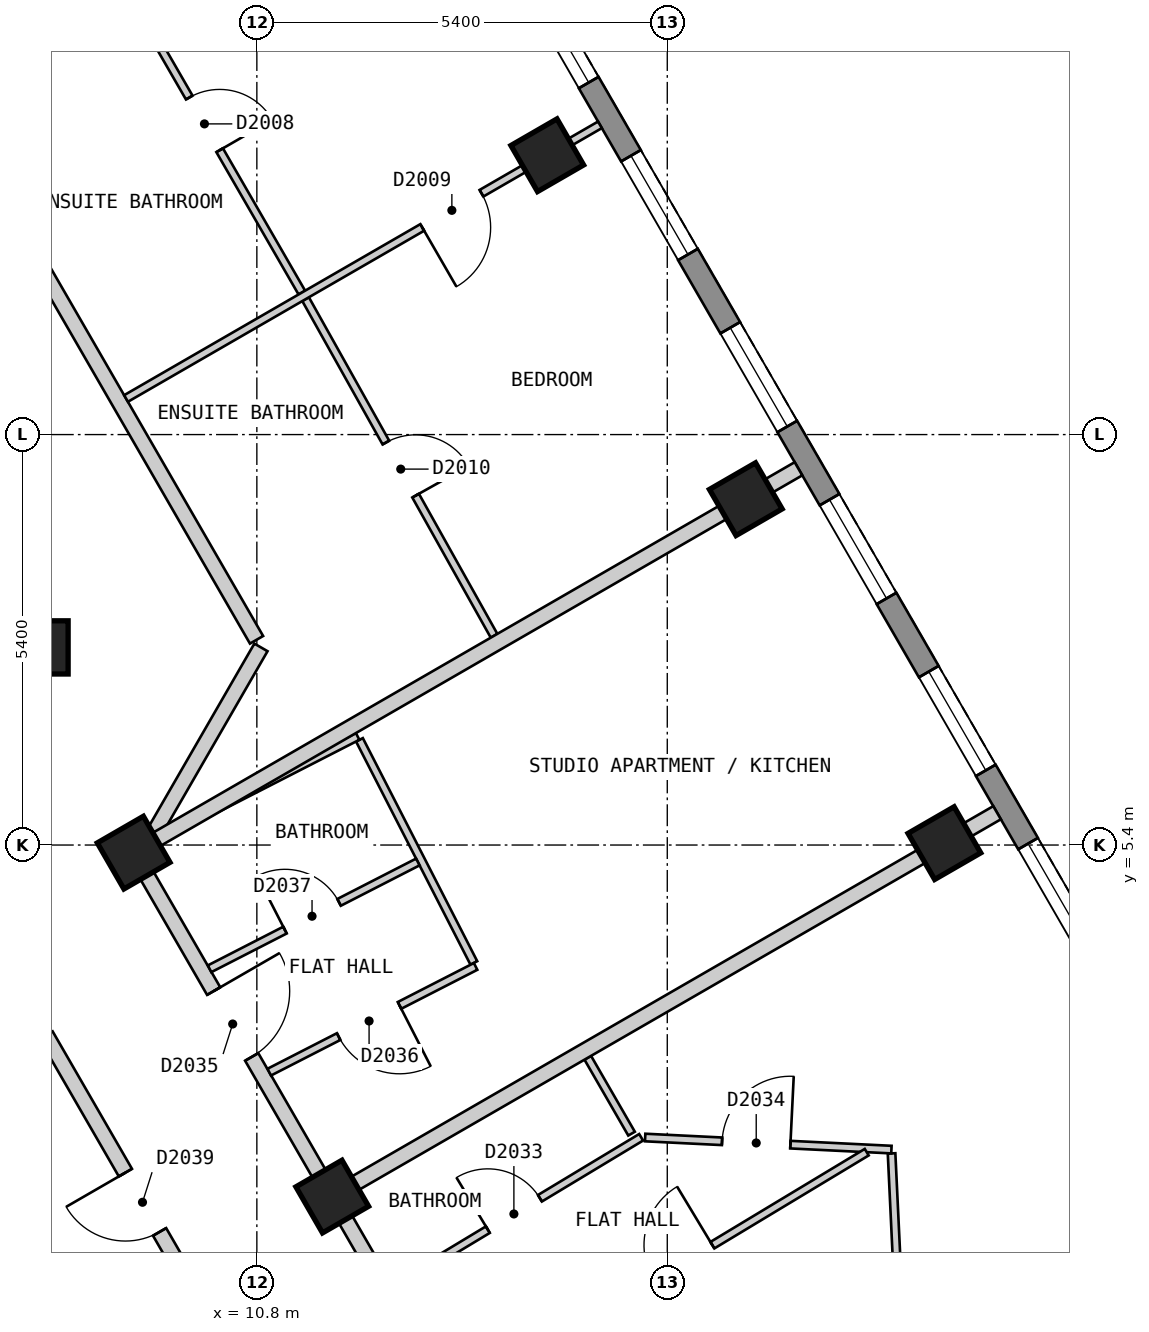
"""IFC4 building model, lengths in metres.
Left out: names, types, materials, properties, quantities, classifications, styles, units other than length and angle.
Written with IfcOpenShell. Run it as: python <this file> out.ifc"""

import sys

from ifc_helpers import new_model, si_unit, direction, frame, frame_2d, origin, origin_2d, place, context, subcontext, project, spatial, polyline, rectangle, outline, extrude, element, fill, save


model = new_model("IFC4")
c1 = context("Model", 3, precision=1e-05, world=origin(), true_north=direction((0.0, 1.0)))
c2 = subcontext(c1, "Body", "Model", "MODEL_VIEW")
j1 = project(units=[si_unit("LENGTHUNIT", "METRE"), si_unit("PLANEANGLEUNIT", "RADIAN")], contexts=[c1])
p1 = place(None, origin())
s1 = spatial("IfcSite", under=j1, at=p1, CompositionType="ELEMENT")
p2 = place(p1, origin())
s2 = spatial("IfcBuilding", under=s1, at=p2, CompositionType="ELEMENT")
p3 = place(p2, frame((0.0, 0.0, 238.8)))
s3 = spatial("IfcBuildingStorey", under=s2, at=p3, CompositionType="ELEMENT", Elevation=238.8)
for number, where, z_axis, x_axis in (
    (1, (19.846, 5.425, 0.0), (0.0, 0.0, 1.0), (-0.5, 0.866, 0.0)),
    (2, (17.233, 9.95, 0.0), (0.0, 0.0, 1.0), (-0.5, 0.866, 0.0)),
    (3, (14.621, 14.475, 0.0), (0.0, 0.0, 1.0), (-0.5, 0.866, 0.0)),
    (4, (11.792, 0.775, 0.0), (0.0, 0.0, 1.0), (-0.5, 0.866, 0.0)),
    (5, (9.179, 5.3, 0.0), (0.0, 0.0, 1.0), (-0.5, 0.866, 0.0)),
    (6, (7.967, 8.0, 0.0), (0.0, 0.0, 1.0), (1.0, 0.0, 0.0)),
):
    element("IfcColumn", number, at=place(p3, frame(where, z_axis=z_axis, x_axis=x_axis)), inside=s3, PredefinedType="COLUMN", context=c2, shape_type="SweptSolid", body=[
        extrude(rectangle(XDim=0.7, YDim=0.7, at=origin_2d()), origin(), (0.0, 0.0, 1.0), 3.0),
    ])
p4 = place(p3, frame((23.599, 0.825, 0.0), z_axis=(0.0, 0.0, 1.0), x_axis=(-0.500003656944, 0.866023292436, 0.0)))
e7 = element("IfcWall", 7, at=p4, inside=s3, PredefinedType="SOLIDWALL", context=c2, shape_type="SweptSolid", body=[
    extrude(outline(polyline([(0.0, -0.15), (22.17, -0.15), (22.09, 0.15), (0.08, 0.15), (0.0, -0.15)])), origin(), (0.0, 0.0, 1.0), 2.7),
])
p5 = place(p4, frame((1.191, 0.0, 0.15)))
e8 = element("IfcOpeningElement", 8, at=p5, cuts=e7, PredefinedType="OPENING", context=c2, shape_type="SweptSolid", body=[
    extrude(rectangle(XDim=1.5, YDim=2.1, at=frame_2d((0.75, 1.05))), frame((0.0, 0.16, 0.0), z_axis=(0.0, -1.0, 0.0), x_axis=(1.0, 0.0, 0.0)), (0.0, 0.0, 1.0), 0.32),
])
p6 = place(p4, frame((3.804, 0.0, 0.15)))
e9 = element("IfcOpeningElement", 9, at=p6, cuts=e7, PredefinedType="OPENING", context=c2, shape_type="SweptSolid", body=[
    extrude(rectangle(XDim=1.5, YDim=2.1, at=frame_2d((0.75, 1.05))), frame((0.0, 0.16, 0.0), z_axis=(0.0, -1.0, 0.0), x_axis=(1.0, 0.0, 0.0)), (0.0, 0.0, 1.0), 0.32),
])
p7 = place(p4, frame((6.417, 0.0, 0.15)))
e10 = element("IfcOpeningElement", 10, at=p7, cuts=e7, PredefinedType="OPENING", context=c2, shape_type="SweptSolid", body=[
    extrude(rectangle(XDim=1.5, YDim=2.1, at=frame_2d((0.75, 1.05))), frame((0.0, 0.16, 0.0), z_axis=(0.0, -1.0, 0.0), x_axis=(1.0, 0.0, 0.0)), (0.0, 0.0, 1.0), 0.32),
])
p8 = place(p4, frame((9.029, 0.0, 0.15)))
e11 = element("IfcOpeningElement", 11, at=p8, cuts=e7, PredefinedType="OPENING", context=c2, shape_type="SweptSolid", body=[
    extrude(rectangle(XDim=1.5, YDim=2.1, at=frame_2d((0.75, 1.05))), frame((0.0, 0.16, 0.0), z_axis=(0.0, -1.0, 0.0), x_axis=(1.0, 0.0, 0.0)), (0.0, 0.0, 1.0), 0.32),
])
p9 = place(p4, frame((11.641, 0.0, 0.15)))
e12 = element("IfcOpeningElement", 12, at=p9, cuts=e7, PredefinedType="OPENING", context=c2, shape_type="SweptSolid", body=[
    extrude(rectangle(XDim=1.5, YDim=2.1, at=frame_2d((0.75, 1.05))), frame((0.0, 0.16, 0.0), z_axis=(0.0, -1.0, 0.0), x_axis=(1.0, 0.0, 0.0)), (0.0, 0.0, 1.0), 0.32),
])
p10 = place(p4, frame((14.254, 0.0, 0.15)))
e13 = element("IfcOpeningElement", 13, at=p10, cuts=e7, PredefinedType="OPENING", context=c2, shape_type="SweptSolid", body=[
    extrude(rectangle(XDim=1.5, YDim=2.1, at=frame_2d((0.75, 1.05))), frame((0.0, 0.16, 0.0), z_axis=(0.0, -1.0, 0.0), x_axis=(1.0, 0.0, 0.0)), (0.0, 0.0, 1.0), 0.32),
])
p11 = place(p4, frame((16.866, 0.0, 0.15)))
e14 = element("IfcOpeningElement", 14, at=p11, cuts=e7, PredefinedType="OPENING", context=c2, shape_type="SweptSolid", body=[
    extrude(rectangle(XDim=1.5, YDim=2.1, at=frame_2d((0.75, 1.05))), frame((0.0, 0.16, 0.0), z_axis=(0.0, -1.0, 0.0), x_axis=(1.0, 0.0, 0.0)), (0.0, 0.0, 1.0), 0.32),
])
p12 = place(p4, frame((19.479, 0.0, 0.15)))
e15 = element("IfcOpeningElement", 15, at=p12, cuts=e7, PredefinedType="OPENING", context=c2, shape_type="SweptSolid", body=[
    extrude(rectangle(XDim=1.5, YDim=2.1, at=frame_2d((0.75, 1.05))), frame((0.0, 0.16, 0.0), z_axis=(0.0, -1.0, 0.0), x_axis=(1.0, 0.0, 0.0)), (0.0, 0.0, 1.0), 0.32),
])
p13 = place(p3, frame((8.026, 2.899, 0.0), z_axis=(0.0, 0.0, 1.0), x_axis=(0.499986018985, -0.866033475577, 0.0)))
e16 = element("IfcWall", 16, at=p13, inside=s3, PredefinedType="PARTITIONING", context=c2, shape_type="SweptSolid", body=[
    extrude(rectangle(XDim=5.078, YDim=0.2, at=frame_2d((2.539, 0.0))), origin(), (0.0, 0.0, 1.0), 2.7),
])
p14 = place(p13, frame((2.089, 0.0, 0.0)))
e17 = element("IfcOpeningElement", 17, at=p14, cuts=e16, PredefinedType="OPENING", context=c2, shape_type="SweptSolid", body=[
    extrude(rectangle(XDim=0.9, YDim=2.1, at=frame_2d((0.45, 1.05))), frame((0.0, 0.11, 0.0), z_axis=(0.0, -1.0, 0.0), x_axis=(1.0, 0.0, 0.0)), (0.0, 0.0, 1.0), 0.22),
])
p15 = place(p3, frame((9.238, 5.2, 0.0), z_axis=(0.0, 0.0, 1.0), x_axis=(0.500025705601, -0.86601056214, 0.0)))
e18 = element("IfcWall", 18, at=p15, inside=s3, PredefinedType="PARTITIONING", context=c2, shape_type="SweptSolid", body=[
    extrude(rectangle(XDim=7.735, YDim=0.2, at=frame_2d((3.868, 0.0))), origin(), (0.0, 0.0, 1.0), 2.7),
])
p16 = place(p15, frame((6.705, 0.0, 0.0)))
e19 = element("IfcOpeningElement", 19, at=p16, cuts=e18, PredefinedType="OPENING", context=c2, shape_type="SweptSolid", body=[
    extrude(rectangle(XDim=1.0, YDim=2.1, at=frame_2d((0.5, 1.05))), frame((0.0, 0.11, 0.0), z_axis=(0.0, -1.0, 0.0), x_axis=(1.0, 0.0, 0.0)), (0.0, 0.0, 1.0), 0.22),
])
p17 = place(p15, frame((1.988, 0.0, 0.0)))
e20 = element("IfcOpeningElement", 20, at=p17, cuts=e18, PredefinedType="OPENING", context=c2, shape_type="SweptSolid", body=[
    extrude(rectangle(XDim=1.0, YDim=2.1, at=frame_2d((0.5, 1.05))), frame((0.0, 0.11, 0.0), z_axis=(0.0, -1.0, 0.0), x_axis=(1.0, 0.0, 0.0)), (0.0, 0.0, 1.0), 0.22),
])
p18 = place(p3, frame((5.485, 17.3, 0.0), z_axis=(0.0, 0.0, 1.0), x_axis=(0.499943285704, -0.866058145322, 0.0)))
e21 = element("IfcWall", 21, at=p18, inside=s3, PredefinedType="PARTITIONING", context=c2, shape_type="SweptSolid", body=[
    extrude(rectangle(XDim=10.623, YDim=0.2, at=frame_2d((5.312, 0.0))), origin(), (0.0, 0.0, 1.0), 2.7),
])
p19 = place(p3, frame((9.454, 5.574, 0.0), z_axis=(0.0, 0.0, 1.0), x_axis=(0.499795394297, 0.86614350072, 0.0)))
e22 = element("IfcWall", 22, at=p19, inside=s3, PredefinedType="PARTITIONING", context=c2, shape_type="SweptSolid", body=[
    extrude(rectangle(XDim=2.801, YDim=0.2, at=frame_2d((1.4, 0.0))), origin(), (0.0, 0.0, 1.0), 2.7),
])
p20 = place(p3, frame((15.154, 2.601, 0.0), z_axis=(0.0, 0.0, 1.0), x_axis=(0.499808046739, -0.866136199691, 0.0)))
e23 = element("IfcWall", 23, at=p20, inside=s3, PredefinedType="PARTITIONING", context=c2, shape_type="SweptSolid", body=[
    extrude(rectangle(XDim=1.152, YDim=0.1, at=frame_2d((0.576, 0.0))), origin(), (0.0, 0.0, 1.0), 2.7),
])
p21 = place(p3, frame((8.829, 17.107, 0.0), z_axis=(0.0, 0.0, 1.0), x_axis=(0.500022055211, -0.866012669828, 0.0)))
e24 = element("IfcWall", 24, at=p21, inside=s3, PredefinedType="PARTITIONING", context=c2, shape_type="SweptSolid", body=[
    extrude(rectangle(XDim=5.126, YDim=0.1, at=frame_2d((2.563, 0.0))), origin(), (0.0, 0.0, 1.0), 2.7),
])
p22 = place(p21, frame((2.163, 0.0, 0.0)))
e25 = element("IfcOpeningElement", 25, at=p22, cuts=e24, PredefinedType="OPENING", context=c2, shape_type="SweptSolid", body=[
    extrude(rectangle(XDim=0.8, YDim=2.1, at=frame_2d((0.4, 1.05))), frame((0.0, 0.06, 0.0), z_axis=(0.0, -1.0, 0.0), x_axis=(1.0, 0.0, 0.0)), (0.0, 0.0, 1.0), 0.12),
])
p23 = place(p3, frame((11.441, 12.582, 0.0), z_axis=(0.0, 0.0, 1.0), x_axis=(0.488568218554, -0.872525699231, 0.0)))
e26 = element("IfcWall", 26, at=p23, inside=s3, PredefinedType="PARTITIONING", context=c2, shape_type="SweptSolid", body=[
    extrude(rectangle(XDim=5.076, YDim=0.1, at=frame_2d((2.538, 0.0))), origin(), (0.0, 0.0, 1.0), 2.7),
])
p24 = place(p23, frame((2.163, 0.0, 0.0)))
e27 = element("IfcOpeningElement", 27, at=p24, cuts=e26, PredefinedType="OPENING", context=c2, shape_type="SweptSolid", body=[
    extrude(rectangle(XDim=0.8, YDim=2.1, at=frame_2d((0.4, 1.05))), frame((0.0, 0.06, 0.0), z_axis=(0.0, -1.0, 0.0), x_axis=(1.0, 0.0, 0.0)), (0.0, 0.0, 1.0), 0.12),
])
p25 = place(p3, frame((12.15, 6.784, 0.0), z_axis=(0.0, 0.0, 1.0), x_axis=(0.456339188969, -0.889805902774, 0.0)))
e28 = element("IfcWall", 28, at=p25, inside=s3, PredefinedType="PARTITIONING", context=c2, shape_type="SweptSolid", body=[
    extrude(rectangle(XDim=3.298, YDim=0.1, at=frame_2d((1.649, 0.0))), origin(), (0.0, 0.0, 1.0), 2.7),
])
p26 = place(p3, frame((19.151, 1.343, 0.0), z_axis=(0.0, 0.0, 1.0), x_axis=(0.047509130714, -0.998870803707, 0.0)))
e29 = element("IfcWall", 29, at=p26, inside=s3, PredefinedType="PARTITIONING", context=c2, shape_type="SweptSolid", body=[
    extrude(rectangle(XDim=3.52, YDim=0.1, at=frame_2d((1.76, 0.0))), origin(), (0.0, 0.0, 1.0), 2.7),
])
p27 = place(p3, frame((15.909, 1.552, 0.0), z_axis=(0.0, 0.0, 1.0), x_axis=(0.998799003463, -0.048995414909, 0.0)))
e30 = element("IfcWall", 30, at=p27, inside=s3, PredefinedType="PARTITIONING", context=c2, shape_type="SweptSolid", body=[
    extrude(rectangle(XDim=3.244, YDim=0.1, at=frame_2d((1.622, 0.0))), origin(), (0.0, 0.0, 1.0), 2.7),
])
p28 = place(p27, frame((1.013, 0.0, 0.0)))
e31 = element("IfcOpeningElement", 31, at=p28, cuts=e30, PredefinedType="OPENING", context=c2, shape_type="SweptSolid", body=[
    extrude(rectangle(XDim=0.9, YDim=2.1, at=frame_2d((0.45, 1.05))), frame((0.0, 0.06, 0.0), z_axis=(0.0, -1.0, 0.0), x_axis=(1.0, 0.0, 0.0)), (0.0, 0.0, 1.0), 0.12),
])
p29 = place(p3, frame((10.178, 3.772, 0.0), z_axis=(0.0, 0.0, 1.0), x_axis=(0.889829844516, 0.456292502467, 0.0)))
e32 = element("IfcWall", 32, at=p29, inside=s3, PredefinedType="PARTITIONING", context=c2, shape_type="SweptSolid", body=[
    extrude(rectangle(XDim=3.079, YDim=0.1, at=frame_2d((1.54, 0.0))), origin(), (0.0, 0.0, 1.0), 2.7),
])
p30 = place(p29, frame((1.115, 0.0, 0.0)))
e33 = element("IfcOpeningElement", 33, at=p30, cuts=e32, PredefinedType="OPENING", context=c2, shape_type="SweptSolid", body=[
    extrude(rectangle(XDim=0.8, YDim=2.1, at=frame_2d((0.4, 1.05))), frame((0.0, 0.06, 0.0), z_axis=(0.0, -1.0, 0.0), x_axis=(1.0, 0.0, 0.0)), (0.0, 0.0, 1.0), 0.12),
])
p31 = place(p3, frame((10.963, 2.412, 0.0), z_axis=(0.0, 0.0, 1.0), x_axis=(0.890014850977, 0.455931535475, 0.0)))
e34 = element("IfcWall", 34, at=p31, inside=s3, PredefinedType="PARTITIONING", context=c2, shape_type="SweptSolid", body=[
    extrude(rectangle(XDim=3.051, YDim=0.1, at=frame_2d((1.525, 0.0))), origin(), (0.0, 0.0, 1.0), 2.7),
])
p32 = place(p31, frame((1.026, 0.0, 0.0)))
e35 = element("IfcOpeningElement", 35, at=p32, cuts=e34, PredefinedType="OPENING", context=c2, shape_type="SweptSolid", body=[
    extrude(rectangle(XDim=0.9, YDim=2.1, at=frame_2d((0.45, 1.05))), frame((0.0, 0.06, 0.0), z_axis=(0.0, -1.0, 0.0), x_axis=(1.0, 0.0, 0.0)), (0.0, 0.0, 1.0), 0.12),
])
p33 = place(p3, frame((9.457, 5.461, 0.0), z_axis=(0.0, 0.0, 1.0), x_axis=(0.889888641814, 0.456177821874, 0.0)))
e36 = element("IfcWall", 36, at=p33, inside=s3, PredefinedType="PARTITIONING", context=c2, shape_type="SweptSolid", body=[
    extrude(rectangle(XDim=2.999, YDim=0.1, at=frame_2d((1.5, 0.0))), origin(), (0.0, 0.0, 1.0), 2.7),
])
p34 = place(p3, frame((9.079, 11.275, 0.0), z_axis=(0.0, 0.0, 1.0), x_axis=(0.866001485781, 0.500041424909, 0.0)))
e37 = element("IfcWall", 37, at=p34, inside=s3, PredefinedType="PARTITIONING", context=c2, shape_type="SweptSolid", body=[
    extrude(rectangle(XDim=7.2, YDim=0.1, at=frame_2d((3.6, 0.0))), origin(), (0.0, 0.0, 1.0), 2.7),
])
p35 = place(p34, frame((4.5, 0.0, 0.0)))
e38 = element("IfcOpeningElement", 38, at=p35, cuts=e37, PredefinedType="OPENING", context=c2, shape_type="SweptSolid", body=[
    extrude(rectangle(XDim=0.9, YDim=2.1, at=frame_2d((0.45, 1.05))), frame((0.0, 0.06, 0.0), z_axis=(0.0, -1.0, 0.0), x_axis=(1.0, 0.0, 0.0)), (0.0, 0.0, 1.0), 0.12),
])
p36 = place(p3, frame((12.593, -0.411, 0.0), z_axis=(0.0, 0.0, 1.0), x_axis=(0.856558445359, 0.516050026339, 0.0)))
e39 = element("IfcWall", 39, at=p36, inside=s3, PredefinedType="PARTITIONING", context=c2, shape_type="SweptSolid", body=[
    extrude(rectangle(XDim=3.809, YDim=0.1, at=frame_2d((1.905, 0.0))), origin(), (0.0, 0.0, 1.0), 2.7),
])
p37 = place(p36, frame((1.455, 0.0, 0.0)))
e40 = element("IfcOpeningElement", 40, at=p37, cuts=e39, PredefinedType="OPENING", context=c2, shape_type="SweptSolid", body=[
    extrude(rectangle(XDim=0.8, YDim=2.1, at=frame_2d((0.4, 1.05))), frame((0.0, 0.06, 0.0), z_axis=(0.0, -1.0, 0.0), x_axis=(1.0, 0.0, 0.0)), (0.0, 0.0, 1.0), 0.12),
])
p38 = place(p3, frame((14.081, -1.499, 0.0), z_axis=(0.0, 0.0, 1.0), x_axis=(0.85652273816, 0.516109289798, 0.0)))
e41 = element("IfcWall", 41, at=p38, inside=s3, PredefinedType="PARTITIONING", context=c2, shape_type="SweptSolid", body=[
    extrude(rectangle(XDim=5.537, YDim=0.1, at=frame_2d((2.769, 0.0))), origin(), (0.0, 0.0, 1.0), 2.7),
])
p39 = place(p38, frame((2.267, 0.0, 0.0)))
e42 = element("IfcOpeningElement", 42, at=p39, cuts=e41, PredefinedType="OPENING", context=c2, shape_type="SweptSolid", body=[
    extrude(rectangle(XDim=0.9, YDim=2.1, at=frame_2d((0.45, 1.05))), frame((0.0, 0.06, 0.0), z_axis=(0.0, -1.0, 0.0), x_axis=(1.0, 0.0, 0.0)), (0.0, 0.0, 1.0), 0.12),
])
p40 = place(p3, frame((11.879, 0.826, 0.0), z_axis=(0.0, 0.0, 1.0), x_axis=(0.866065245018, 0.499930986609, 0.0)))
e43 = element("IfcWall", 43, at=p40, inside=s3, PredefinedType="PARTITIONING", context=c2, shape_type="SweptSolid", body=[
    extrude(rectangle(XDim=10.0, YDim=0.2, at=frame_2d((5.0, 0.0))), origin(), (0.0, 0.0, 1.0), 2.7),
])
p41 = place(p3, frame((9.354, 5.401, 0.0), z_axis=(0.0, 0.0, 1.0), x_axis=(0.866018411306, 0.500012111133, 0.0)))
e44 = element("IfcWall", 44, at=p41, inside=s3, PredefinedType="PARTITIONING", context=c2, shape_type="SweptSolid", body=[
    extrude(rectangle(XDim=9.898, YDim=0.2, at=frame_2d((4.949, 0.0))), origin(), (0.0, 0.0, 1.0), 2.7),
])
p42 = place(p6, origin())
e45 = element("IfcWindow", 45, at=p42, inside=s3, PartitioningType="SINGLE_PANEL", PredefinedType="WINDOW", context=c2, shape_type="SweptSolid", body=[
    extrude(rectangle(XDim=1.5, YDim=2.1, at=frame_2d((0.75, 1.05))), frame((0.0, 0.03, 0.0), z_axis=(0.0, -1.0, 0.0), x_axis=(1.0, 0.0, 0.0)), (0.0, 0.0, 1.0), 0.06),
])
fill(e9, e45)
p43 = place(p7, origin())
e46 = element("IfcWindow", 46, at=p43, inside=s3, PartitioningType="SINGLE_PANEL", PredefinedType="WINDOW", context=c2, shape_type="SweptSolid", body=[
    extrude(rectangle(XDim=1.5, YDim=2.1, at=frame_2d((0.75, 1.05))), frame((0.0, 0.03, 0.0), z_axis=(0.0, -1.0, 0.0), x_axis=(1.0, 0.0, 0.0)), (0.0, 0.0, 1.0), 0.06),
])
fill(e10, e46)
p44 = place(p8, origin())
e47 = element("IfcWindow", 47, at=p44, inside=s3, PartitioningType="SINGLE_PANEL", PredefinedType="WINDOW", context=c2, shape_type="SweptSolid", body=[
    extrude(rectangle(XDim=1.5, YDim=2.1, at=frame_2d((0.75, 1.05))), frame((0.0, 0.03, 0.0), z_axis=(0.0, -1.0, 0.0), x_axis=(1.0, 0.0, 0.0)), (0.0, 0.0, 1.0), 0.06),
])
fill(e11, e47)
p45 = place(p9, origin())
e48 = element("IfcWindow", 48, at=p45, inside=s3, PartitioningType="SINGLE_PANEL", PredefinedType="WINDOW", context=c2, shape_type="SweptSolid", body=[
    extrude(rectangle(XDim=1.5, YDim=2.1, at=frame_2d((0.75, 1.05))), frame((0.0, 0.03, 0.0), z_axis=(0.0, -1.0, 0.0), x_axis=(1.0, 0.0, 0.0)), (0.0, 0.0, 1.0), 0.06),
])
fill(e12, e48)
p46 = place(p10, origin())
e49 = element("IfcWindow", 49, at=p46, inside=s3, PartitioningType="SINGLE_PANEL", PredefinedType="WINDOW", context=c2, shape_type="SweptSolid", body=[
    extrude(rectangle(XDim=1.5, YDim=2.1, at=frame_2d((0.75, 1.05))), frame((0.0, 0.03, 0.0), z_axis=(0.0, -1.0, 0.0), x_axis=(1.0, 0.0, 0.0)), (0.0, 0.0, 1.0), 0.06),
])
fill(e13, e49)
p47 = place(p11, origin())
e50 = element("IfcWindow", 50, at=p47, inside=s3, PartitioningType="SINGLE_PANEL", PredefinedType="WINDOW", context=c2, shape_type="SweptSolid", body=[
    extrude(rectangle(XDim=1.5, YDim=2.1, at=frame_2d((0.75, 1.05))), frame((0.0, 0.03, 0.0), z_axis=(0.0, -1.0, 0.0), x_axis=(1.0, 0.0, 0.0)), (0.0, 0.0, 1.0), 0.06),
])
fill(e14, e50)
p48 = place(p22, origin())
e51 = element("IfcDoor", 51, at=p48, inside=s3, OperationType="SINGLE_SWING_RIGHT", PredefinedType="DOOR", context=c2, shape_type="SweptSolid", body=[
    extrude(rectangle(XDim=0.8, YDim=2.1, at=frame_2d((0.4, 1.05))), frame((0.0, 0.025, 0.0), z_axis=(0.0, -1.0, 0.0), x_axis=(1.0, 0.0, 0.0)), (0.0, 0.0, 1.0), 0.05),
])
fill(e25, e51)
p49 = place(p35, origin())
e52 = element("IfcDoor", 52, at=p49, inside=s3, OperationType="SINGLE_SWING_LEFT", PredefinedType="DOOR", context=c2, shape_type="SweptSolid", body=[
    extrude(rectangle(XDim=0.9, YDim=2.1, at=frame_2d((0.45, 1.05))), frame((0.0, 0.025, 0.0), z_axis=(0.0, -1.0, 0.0), x_axis=(1.0, 0.0, 0.0)), (0.0, 0.0, 1.0), 0.05),
])
fill(e38, e52)
p50 = place(p24, origin())
e53 = element("IfcDoor", 53, at=p50, inside=s3, OperationType="SINGLE_SWING_RIGHT", PredefinedType="DOOR", context=c2, shape_type="SweptSolid", body=[
    extrude(rectangle(XDim=0.8, YDim=2.1, at=frame_2d((0.4, 1.05))), frame((0.0, 0.025, 0.0), z_axis=(0.0, -1.0, 0.0), x_axis=(1.0, 0.0, 0.0)), (0.0, 0.0, 1.0), 0.05),
])
fill(e27, e53)
p51 = place(p39, origin())
e54 = element("IfcDoor", 54, at=p51, inside=s3, OperationType="SINGLE_SWING_RIGHT", PredefinedType="DOOR", context=c2, shape_type="SweptSolid", body=[
    extrude(rectangle(XDim=0.9, YDim=2.1, at=frame_2d((0.45, 1.05))), frame((0.0, 0.025, 0.0), z_axis=(0.0, -1.0, 0.0), x_axis=(1.0, 0.0, 0.0)), (0.0, 0.0, 1.0), 0.05),
])
fill(e42, e54)
p52 = place(p37, origin())
e55 = element("IfcDoor", 55, at=p52, inside=s3, OperationType="SINGLE_SWING_LEFT", PredefinedType="DOOR", context=c2, shape_type="SweptSolid", body=[
    extrude(rectangle(XDim=0.8, YDim=2.1, at=frame_2d((0.4, 1.05))), frame((0.0, 0.025, 0.0), z_axis=(0.0, -1.0, 0.0), x_axis=(1.0, 0.0, 0.0)), (0.0, 0.0, 1.0), 0.05),
])
fill(e40, e55)
p53 = place(p28, origin())
e56 = element("IfcDoor", 56, at=p53, inside=s3, OperationType="SINGLE_SWING_RIGHT", PredefinedType="DOOR", context=c2, shape_type="SweptSolid", body=[
    extrude(rectangle(XDim=0.9, YDim=2.1, at=frame_2d((0.45, 1.05))), frame((0.0, 0.025, 0.0), z_axis=(0.0, -1.0, 0.0), x_axis=(1.0, 0.0, 0.0)), (0.0, 0.0, 1.0), 0.05),
])
fill(e31, e56)
p54 = place(p17, origin())
e57 = element("IfcDoor", 57, at=p54, inside=s3, OperationType="SINGLE_SWING_LEFT", PredefinedType="DOOR", context=c2, shape_type="SweptSolid", body=[
    extrude(rectangle(XDim=1.0, YDim=2.1, at=frame_2d((0.5, 1.05))), frame((0.0, 0.025, 0.0), z_axis=(0.0, -1.0, 0.0), x_axis=(1.0, 0.0, 0.0)), (0.0, 0.0, 1.0), 0.05),
])
fill(e20, e57)
p55 = place(p32, origin())
e58 = element("IfcDoor", 58, at=p55, inside=s3, OperationType="SINGLE_SWING_RIGHT", PredefinedType="DOOR", context=c2, shape_type="SweptSolid", body=[
    extrude(rectangle(XDim=0.9, YDim=2.1, at=frame_2d((0.45, 1.05))), frame((0.0, 0.025, 0.0), z_axis=(0.0, -1.0, 0.0), x_axis=(1.0, 0.0, 0.0)), (0.0, 0.0, 1.0), 0.05),
])
fill(e35, e58)
p56 = place(p30, origin())
e59 = element("IfcDoor", 59, at=p56, inside=s3, OperationType="SINGLE_SWING_LEFT", PredefinedType="DOOR", context=c2, shape_type="SweptSolid", body=[
    extrude(rectangle(XDim=0.8, YDim=2.1, at=frame_2d((0.4, 1.05))), frame((0.0, 0.025, 0.0), z_axis=(0.0, -1.0, 0.0), x_axis=(1.0, 0.0, 0.0)), (0.0, 0.0, 1.0), 0.05),
])
fill(e33, e59)
p57 = place(p14, origin())
e60 = element("IfcDoor", 60, at=p57, inside=s3, OperationType="SINGLE_SWING_LEFT", PredefinedType="DOOR", context=c2, shape_type="SweptSolid", body=[
    extrude(rectangle(XDim=0.9, YDim=2.1, at=frame_2d((0.45, 1.05))), frame((0.0, 0.025, 0.0), z_axis=(0.0, -1.0, 0.0), x_axis=(1.0, 0.0, 0.0)), (0.0, 0.0, 1.0), 0.05),
])
fill(e17, e60)
save(model, sys.argv[1])
